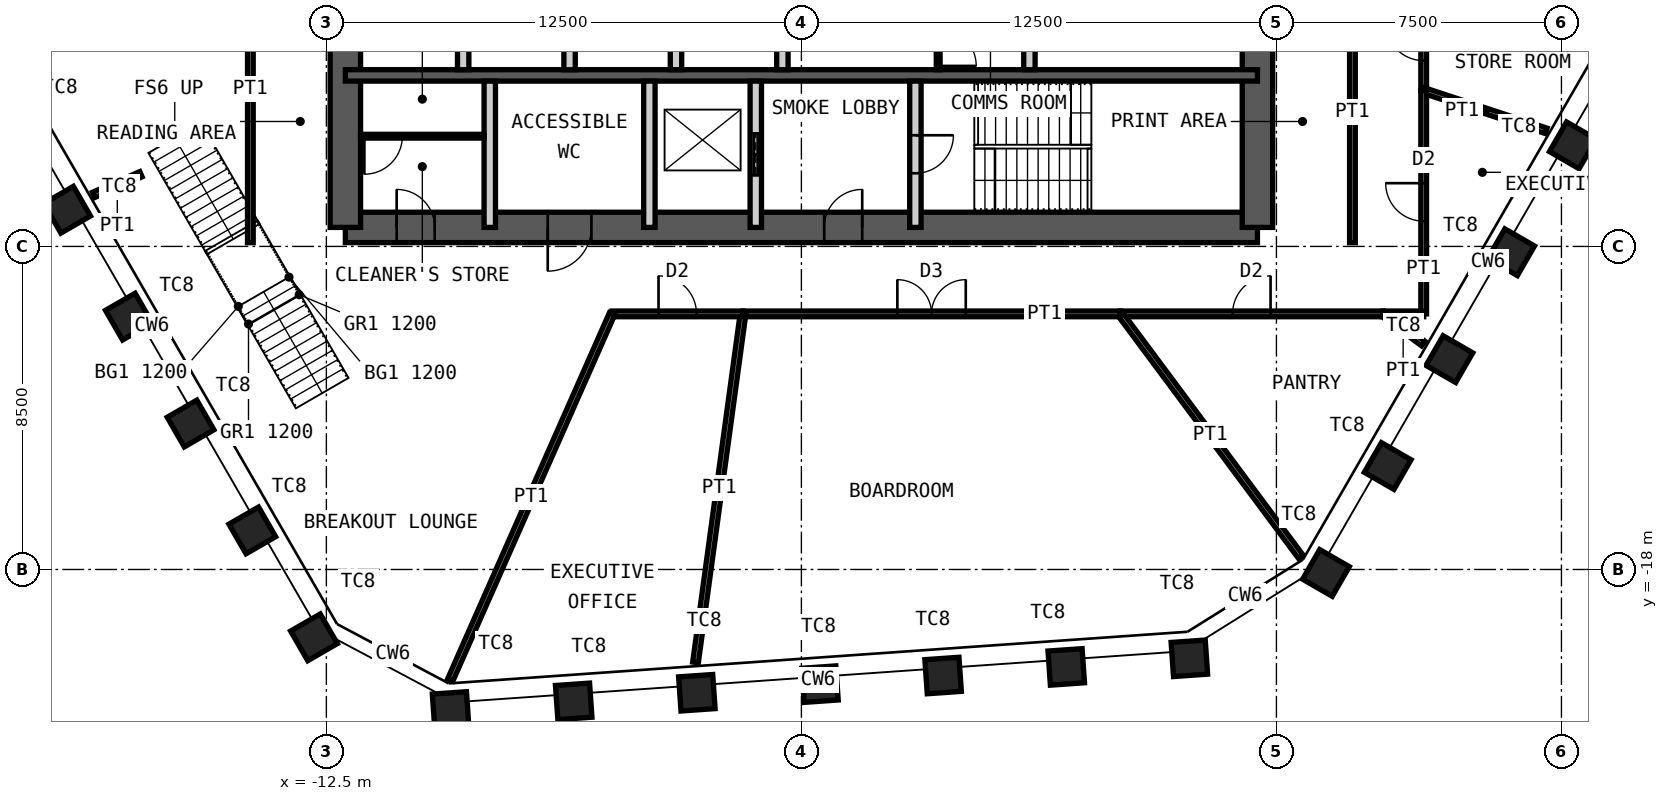
"""IFC4 building model, lengths in metres.
Left out: names, types, materials, properties, quantities, classifications, styles, units other than length and angle.
Written with IfcOpenShell. Run it as: python <this file> out.ifc"""

import sys

from ifc_helpers import new_model, si_unit, direction, frame, frame_2d, origin, origin_2d, place, context, subcontext, project, spatial, rectangle, hollow_rectangle, extrude, element, fill, save


model = new_model("IFC4")
c1 = context("Model", 3, precision=1e-05, world=origin(), true_north=direction((0.0, 1.0)))
c2 = subcontext(c1, "Body", "Model", "MODEL_VIEW")
j1 = project(units=[si_unit("LENGTHUNIT", "METRE"), si_unit("PLANEANGLEUNIT", "RADIAN")], contexts=[c1])
p1 = place(None, origin())
s1 = spatial("IfcSite", under=j1, at=p1, CompositionType="ELEMENT")
p2 = place(p1, origin())
s2 = spatial("IfcBuilding", under=s1, at=p2, CompositionType="ELEMENT")
p3 = place(p2, frame((0.0, 0.0, 329.2)))
s3 = spatial("IfcBuildingStorey", under=s2, at=p3, CompositionType="ELEMENT", Elevation=329.2)
for number, where, z_axis, x_axis in (
    (1, (20.3, -6.84, 0.0), (0.0, 0.0, 1.0), (0.5, 0.866, 0.0)),
    (2, (18.676, -9.653, 0.0), (0.0, 0.0, 1.0), (0.5, 0.866, 0.0)),
    (3, (17.052, -12.466, 0.0), (0.0, 0.0, 1.0), (0.5, 0.866, 0.0)),
    (4, (15.427, -15.279, 0.0), (0.0, 0.0, 1.0), (0.5, 0.866, 0.0)),
    (5, (13.803, -18.092, 0.0), (0.0, 0.0, 1.0), (0.5, 0.866, 0.0)),
    (6, (10.209, -20.337, 0.0), (0.0, 0.0, 1.0), (0.998, 0.07, 0.0)),
    (7, (6.969, -20.564, 0.0), (0.0, 0.0, 1.0), (0.998, 0.07, 0.0)),
    (8, (3.729, -20.791, 0.0), (0.0, 0.0, 1.0), (0.998, 0.07, 0.0)),
    (9, (0.489, -21.017, 0.0), (0.0, 0.0, 1.0), (0.998, 0.07, 0.0)),
    (10, (-2.751, -21.244, 0.0), (0.0, 0.0, 1.0), (0.998, 0.07, 0.0)),
    (11, (-5.991, -21.47, 0.0), (0.0, 0.0, 1.0), (0.998, 0.07, 0.0)),
    (12, (-9.231, -21.697, 0.0), (0.0, 0.0, 1.0), (0.998, 0.07, 0.0)),
    (13, (-12.825, -19.786, 0.0), (0.0, 0.0, 1.0), (0.5, -0.866, 0.0)),
    (14, (-14.449, -16.973, 0.0), (0.0, 0.0, 1.0), (0.5, -0.866, 0.0)),
    (15, (-16.073, -14.16, 0.0), (0.0, 0.0, 1.0), (0.5, -0.866, 0.0)),
    (16, (-17.698, -11.347, 0.0), (0.0, 0.0, 1.0), (0.5, -0.866, 0.0)),
    (17, (-19.322, -8.534, 0.0), (0.0, 0.0, 1.0), (0.5, -0.866, 0.0)),
):
    element("IfcColumn", number, at=place(p3, frame(where, z_axis=z_axis, x_axis=x_axis)), inside=s3, PredefinedType="COLUMN", context=c2, shape_type="SweptSolid", body=[
        extrude(hollow_rectangle(XDim=0.9, YDim=0.9, WallThickness=0.05, at=origin_2d()), origin(), (0.0, 0.0, 1.0), 4.2),
    ])
p4 = place(p3, frame((-12.0, -9.0, 0.0), z_axis=(0.0, 0.0, 1.0), x_axis=(1.0, 0.0, 0.0)))
e18 = element("IfcWall", 18, at=p4, inside=s3, PredefinedType="SHEAR", context=c2, shape_type="SweptSolid", body=[
    extrude(rectangle(XDim=24.0, YDim=0.8, at=frame_2d((12.0, 0.0))), origin(), (0.0, 0.0, 1.0), 4.2),
])
p5 = place(p4, frame((1.35, 0.0, 0.0)))
e19 = element("IfcOpeningElement", 19, at=p5, cuts=e18, PredefinedType="OPENING", context=c2, shape_type="SweptSolid", body=[
    extrude(rectangle(XDim=1.0, YDim=2.1, at=frame_2d((0.5, 1.05))), frame((0.0, 0.41, 0.0), z_axis=(0.0, -1.0, 0.0), x_axis=(1.0, 0.0, 0.0)), (0.0, 0.0, 1.0), 0.82),
])
p6 = place(p4, frame((5.325, 0.0, 0.0)))
e20 = element("IfcOpeningElement", 20, at=p6, cuts=e18, PredefinedType="OPENING", context=c2, shape_type="SweptSolid", body=[
    extrude(rectangle(XDim=1.15, YDim=2.1, at=frame_2d((0.575, 1.05))), frame((0.0, 0.41, 0.0), z_axis=(0.0, -1.0, 0.0), x_axis=(1.0, 0.0, 0.0)), (0.0, 0.0, 1.0), 0.82),
])
p7 = place(p4, frame((12.6, 0.0, 0.0)))
e21 = element("IfcOpeningElement", 21, at=p7, cuts=e18, PredefinedType="OPENING", context=c2, shape_type="SweptSolid", body=[
    extrude(rectangle(XDim=1.0, YDim=2.1, at=frame_2d((0.5, 1.05))), frame((0.0, 0.41, 0.0), z_axis=(0.0, -1.0, 0.0), x_axis=(1.0, 0.0, 0.0)), (0.0, 0.0, 1.0), 0.82),
])
p8 = place(p3, frame((12.0, -9.0, 0.0), z_axis=(0.0, 0.0, 1.0), x_axis=(0.0, 1.0, 0.0)))
e22 = element("IfcWall", 22, at=p8, inside=s3, PredefinedType="SHEAR", context=c2, shape_type="SweptSolid", body=[
    extrude(rectangle(XDim=18.0, YDim=0.8, at=frame_2d((9.0, 0.0))), origin(), (0.0, 0.0, 1.0), 4.2),
])
p9 = place(p8, frame((8.1, 0.0, 0.0)))
e23 = element("IfcOpeningElement", 23, at=p9, cuts=e22, PredefinedType="OPENING", context=c2, shape_type="SweptSolid", body=[
    extrude(rectangle(XDim=1.8, YDim=2.1, at=frame_2d((0.9, 1.05))), frame((0.0, 0.41, 0.0), z_axis=(0.0, -1.0, 0.0), x_axis=(1.0, 0.0, 0.0)), (0.0, 0.0, 1.0), 0.82),
])
p10 = place(p3, frame((-12.0, -9.0, 0.0), z_axis=(0.0, 0.0, 1.0), x_axis=(0.0, 1.0, 0.0)))
e24 = element("IfcWall", 24, at=p10, inside=s3, PredefinedType="SHEAR", context=c2, shape_type="SweptSolid", body=[
    extrude(rectangle(XDim=18.0, YDim=0.8, at=frame_2d((9.0, 0.0))), origin(), (0.0, 0.0, 1.0), 4.2),
])
p11 = place(p10, frame((8.1, 0.0, 0.0)))
e25 = element("IfcOpeningElement", 25, at=p11, cuts=e24, PredefinedType="OPENING", context=c2, shape_type="SweptSolid", body=[
    extrude(rectangle(XDim=1.8, YDim=2.1, at=frame_2d((0.9, 1.05))), frame((0.0, 0.41, 0.0), z_axis=(0.0, -1.0, 0.0), x_axis=(1.0, 0.0, 0.0)), (0.0, 0.0, 1.0), 0.82),
])
p12 = place(p3, frame((-12.0, -5.0, 0.0), z_axis=(0.0, 0.0, 1.0), x_axis=(1.0, 0.0, 0.0)))
e26 = element("IfcWall", 26, at=p12, inside=s3, PredefinedType="SHEAR", context=c2, shape_type="SweptSolid", body=[
    extrude(rectangle(XDim=24.0, YDim=0.3, at=frame_2d((12.0, 0.0))), origin(), (0.0, 0.0, 1.0), 4.2),
])
for number, where, z_axis, x_axis in (
    (27, (-8.9, -4.85, 0.0), (0.0, 0.0, 1.0), (0.0, 1.0, 0.0)),
    (28, (-6.1, -4.85, 0.0), (0.0, 0.0, 1.0), (0.0, 1.0, 0.0)),
    (29, (-3.3, -4.85, 0.0), (0.0, 0.0, 1.0), (0.0, 1.0, 0.0)),
    (30, (-0.5, -4.85, 0.0), (0.0, 0.0, 1.0), (0.0, 1.0, 0.0)),
    (31, (6.0, -4.85, 0.0), (0.0, 0.0, 1.0), (0.0, 1.0, 0.0)),
):
    element("IfcWall", number, at=place(p3, frame(where, z_axis=z_axis, x_axis=x_axis)), inside=s3, PredefinedType="PARTITIONING", context=c2, shape_type="SweptSolid", body=[
        extrude(rectangle(XDim=2.65, YDim=0.3, at=frame_2d((1.325, 0.0))), origin(), (0.0, 0.0, 1.0), 3.98),
    ])
for number, where, z_axis, x_axis in (
    (32, (-8.2, -9.0, 0.0), (0.0, 0.0, 1.0), (0.0, 1.0, 0.0)),
    (33, (-4.0, -9.0, 0.0), (0.0, 0.0, 1.0), (0.0, 1.0, 0.0)),
):
    element("IfcWall", number, at=place(p3, frame(where, z_axis=z_axis, x_axis=x_axis)), inside=s3, PredefinedType="PARTITIONING", context=c2, shape_type="SweptSolid", body=[
        extrude(rectangle(XDim=3.85, YDim=0.3, at=frame_2d((1.925, 0.0))), origin(), (0.0, 0.0, 1.0), 3.98),
    ])
p13 = place(p3, frame((-1.2, -9.0, 0.0), z_axis=(0.0, 0.0, 1.0), x_axis=(0.0, 1.0, 0.0)))
e34 = element("IfcWall", 34, at=p13, inside=s3, PredefinedType="PARTITIONING", context=c2, shape_type="SweptSolid", body=[
    extrude(rectangle(XDim=3.85, YDim=0.3, at=frame_2d((1.925, 0.0))), origin(), (0.0, 0.0, 1.0), 3.98),
])
p14 = place(p13, frame((1.375, 0.0, 0.0)))
e35 = element("IfcOpeningElement", 35, at=p14, cuts=e34, PredefinedType="OPENING", context=c2, shape_type="SweptSolid", body=[
    extrude(rectangle(XDim=1.1, YDim=2.4, at=frame_2d((0.55, 1.2))), frame((0.0, 0.16, 0.0), z_axis=(0.0, -1.0, 0.0), x_axis=(1.0, 0.0, 0.0)), (0.0, 0.0, 1.0), 0.32),
])
p15 = place(p3, frame((3.0, -9.0, 0.0), z_axis=(0.0, 0.0, 1.0), x_axis=(0.0, 1.0, 0.0)))
e36 = element("IfcWall", 36, at=p15, inside=s3, PredefinedType="PARTITIONING", context=c2, shape_type="SweptSolid", body=[
    extrude(rectangle(XDim=3.85, YDim=0.3, at=frame_2d((1.925, 0.0))), origin(), (0.0, 0.0, 1.0), 3.98),
])
p16 = place(p15, frame((1.425, 0.0, 0.0)))
e37 = element("IfcOpeningElement", 37, at=p16, cuts=e36, PredefinedType="OPENING", context=c2, shape_type="SweptSolid", body=[
    extrude(rectangle(XDim=1.0, YDim=2.1, at=frame_2d((0.5, 1.05))), frame((0.0, 0.16, 0.0), z_axis=(0.0, -1.0, 0.0), x_axis=(1.0, 0.0, 0.0)), (0.0, 0.0, 1.0), 0.32),
])
p17 = place(p3, frame((3.6, -4.85, 0.0), z_axis=(0.0, 0.0, 1.0), x_axis=(0.0, 1.0, 0.0)))
e38 = element("IfcWall", 38, at=p17, inside=s3, PredefinedType="PARTITIONING", context=c2, shape_type="SweptSolid", body=[
    extrude(rectangle(XDim=2.65, YDim=0.1, at=frame_2d((1.325, 0.0))), origin(), (0.0, 0.0, 1.0), 3.98),
])
p18 = place(p17, frame((0.1, 0.0, 0.0)))
e39 = element("IfcOpeningElement", 39, at=p18, cuts=e38, PredefinedType="OPENING", context=c2, shape_type="SweptSolid", body=[
    extrude(rectangle(XDim=1.0, YDim=2.4, at=frame_2d((0.5, 1.2))), frame((0.0, 0.06, 0.0), z_axis=(0.0, -1.0, 0.0), x_axis=(1.0, 0.0, 0.0)), (0.0, 0.0, 1.0), 0.12),
])
p19 = place(p3, frame((-11.6, -6.6, 0.0), z_axis=(0.0, 0.0, 1.0), x_axis=(1.0, 0.0, 0.0)))
e40 = element("IfcWall", 40, at=p19, inside=s3, PredefinedType="PARTITIONING", context=c2, shape_type="SweptSolid", body=[
    extrude(rectangle(XDim=3.25, YDim=0.1, at=frame_2d((1.625, 0.0))), origin(), (0.0, 0.0, 1.0), 3.98),
])
p20 = place(p19, frame((0.1, 0.0, 0.0)))
e41 = element("IfcOpeningElement", 41, at=p20, cuts=e40, PredefinedType="OPENING", context=c2, shape_type="SweptSolid", body=[
    extrude(rectangle(XDim=1.0, YDim=2.4, at=frame_2d((0.5, 1.2))), frame((0.0, 0.06, 0.0), z_axis=(0.0, -1.0, 0.0), x_axis=(1.0, 0.0, 0.0)), (0.0, 0.0, 1.0), 0.12),
])
p21 = place(p3, frame((16.375, -2.825, 0.0), z_axis=(0.0, 0.0, 1.0), x_axis=(0.0, -1.0, 0.0)))
e42 = element("IfcWall", 42, at=p21, inside=s3, PredefinedType="PARTITIONING", context=c2, shape_type="SweptSolid", body=[
    extrude(rectangle(XDim=2.572, YDim=0.15, at=frame_2d((1.286, 0.0))), origin(), (0.0, 0.0, 1.0), 4.03),
])
p22 = place(p21, frame((0.786, 0.0, 0.0)))
e43 = element("IfcOpeningElement", 43, at=p22, cuts=e42, PredefinedType="OPENING", context=c2, shape_type="SweptSolid", body=[
    extrude(rectangle(XDim=1.0, YDim=2.4, at=frame_2d((0.5, 1.2))), frame((0.0, 0.085, 0.0), z_axis=(0.0, -1.0, 0.0), x_axis=(1.0, 0.0, 0.0)), (0.0, 0.0, 1.0), 0.17),
])
p23 = place(p3, frame((19.598, -6.459, 0.0), z_axis=(0.0, 0.0, 1.0), x_axis=(-0.949756799168, 0.312988853532, 0.0)))
e44 = element("IfcWall", 44, at=p23, inside=s3, PredefinedType="PARTITIONING", context=c2, shape_type="SweptSolid", body=[
    extrude(rectangle(XDim=3.394, YDim=0.15, at=frame_2d((1.697, 0.0))), origin(), (0.0, 0.0, 1.0), 3.33),
])
p24 = place(p3, frame((16.375, -5.396, 0.0), z_axis=(0.0, 0.0, 1.0), x_axis=(0.0, -1.0, 0.0)))
e45 = element("IfcWall", 45, at=p24, inside=s3, PredefinedType="PARTITIONING", context=c2, shape_type="SweptSolid", body=[
    extrude(rectangle(XDim=5.878, YDim=0.15, at=frame_2d((2.939, 0.0))), origin(), (0.0, 0.0, 1.0), 4.03),
])
p25 = place(p24, frame((2.439, 0.0, 0.0)))
e46 = element("IfcOpeningElement", 46, at=p25, cuts=e45, PredefinedType="OPENING", context=c2, shape_type="SweptSolid", body=[
    extrude(rectangle(XDim=1.0, YDim=2.4, at=frame_2d((0.5, 1.2))), frame((0.0, 0.085, 0.0), z_axis=(0.0, -1.0, 0.0), x_axis=(1.0, 0.0, 0.0)), (0.0, 0.0, 1.0), 0.17),
])
p26 = place(p3, frame((16.375, -11.275, 0.0), z_axis=(0.0, 0.0, 1.0), x_axis=(-1.0, 0.0, 0.0)))
e47 = element("IfcWall", 47, at=p26, inside=s3, PredefinedType="PARTITIONING", context=c2, shape_type="SweptSolid", body=[
    extrude(rectangle(XDim=1.071, YDim=0.15, at=frame_2d((0.535, 0.0))), origin(), (0.0, 0.0, 1.0), 4.03),
])
p27 = place(p3, frame((16.365, -12.056, 0.0), z_axis=(0.0, 0.0, 1.0), x_axis=(-0.805107064944, 0.593129508604, 0.0)))
e48 = element("IfcWall", 48, at=p27, inside=s3, PredefinedType="PARTITIONING", context=c2, shape_type="SweptSolid", body=[
    extrude(rectangle(XDim=1.318, YDim=0.15, at=frame_2d((0.659, 0.0))), origin(), (0.0, 0.0, 1.0), 3.33),
])
p28 = place(p3, frame((15.304, -11.275, 0.0), z_axis=(0.0, 0.0, 1.0), x_axis=(-1.0, 0.0, 0.0)))
e49 = element("IfcWall", 49, at=p28, inside=s3, PredefinedType="PARTITIONING", context=c2, shape_type="SweptSolid", body=[
    extrude(rectangle(XDim=6.917, YDim=0.15, at=frame_2d((3.458, 0.0))), origin(), (0.0, 0.0, 1.0), 4.03),
])
p29 = place(p28, frame((2.958, 0.0, 0.0)))
e50 = element("IfcOpeningElement", 50, at=p29, cuts=e49, PredefinedType="OPENING", context=c2, shape_type="SweptSolid", body=[
    extrude(rectangle(XDim=1.0, YDim=2.4, at=frame_2d((0.5, 1.2))), frame((0.0, 0.085, 0.0), z_axis=(0.0, -1.0, 0.0), x_axis=(1.0, 0.0, 0.0)), (0.0, 0.0, 1.0), 0.17),
])
p30 = place(p3, frame((13.138, -17.661, 0.0), z_axis=(0.0, 0.0, 1.0), x_axis=(-0.596829877953, 0.802367806422, 0.0)))
e51 = element("IfcWall", 51, at=p30, inside=s3, PredefinedType="PARTITIONING", context=c2, shape_type="SweptSolid", body=[
    extrude(rectangle(XDim=7.959, YDim=0.15, at=frame_2d((3.98, 0.0))), origin(), (0.0, 0.0, 1.0), 2.93),
])
p31 = place(p3, frame((8.387, -11.275, 0.0), z_axis=(0.0, 0.0, 1.0), x_axis=(-1.0, 0.0, 0.0)))
e52 = element("IfcWall", 52, at=p31, inside=s3, PredefinedType="PARTITIONING", context=c2, shape_type="SweptSolid", body=[
    extrude(rectangle(XDim=9.924, YDim=0.15, at=frame_2d((4.962, 0.0))), origin(), (0.0, 0.0, 1.0), 4.03),
])
p32 = place(p31, frame((4.062, 0.0, 0.0)))
e53 = element("IfcOpeningElement", 53, at=p32, cuts=e52, PredefinedType="OPENING", context=c2, shape_type="SweptSolid", body=[
    extrude(rectangle(XDim=1.8, YDim=2.4, at=frame_2d((0.9, 1.2))), frame((0.0, 0.085, 0.0), z_axis=(0.0, -1.0, 0.0), x_axis=(1.0, 0.0, 0.0)), (0.0, 0.0, 1.0), 0.17),
])
p33 = place(p3, frame((-2.786, -20.446, 0.0), z_axis=(0.0, 0.0, 1.0), x_axis=(0.13501904213, 0.990843003842, 0.0)))
e54 = element("IfcWall", 54, at=p33, inside=s3, PredefinedType="PARTITIONING", context=c2, shape_type="SweptSolid", body=[
    extrude(rectangle(XDim=9.256, YDim=0.15, at=frame_2d((4.628, 0.0))), origin(), (0.0, 0.0, 1.0), 3.33),
])
p34 = place(p3, frame((-1.537, -11.275, 0.0), z_axis=(0.0, 0.0, 1.0), x_axis=(-1.0, 0.0, 0.0)))
e55 = element("IfcWall", 55, at=p34, inside=s3, PredefinedType="PARTITIONING", context=c2, shape_type="SweptSolid", body=[
    extrude(rectangle(XDim=3.446, YDim=0.15, at=frame_2d((1.723, 0.0))), origin(), (0.0, 0.0, 1.0), 4.03),
])
p35 = place(p34, frame((1.223, 0.0, 0.0)))
e56 = element("IfcOpeningElement", 56, at=p35, cuts=e55, PredefinedType="OPENING", context=c2, shape_type="SweptSolid", body=[
    extrude(rectangle(XDim=1.0, YDim=2.4, at=frame_2d((0.5, 1.2))), frame((0.0, 0.085, 0.0), z_axis=(0.0, -1.0, 0.0), x_axis=(1.0, 0.0, 0.0)), (0.0, 0.0, 1.0), 0.17),
])
p36 = place(p3, frame((-9.24, -20.907, 0.0), z_axis=(0.0, 0.0, 1.0), x_axis=(0.404227449851, 0.91465849845, 0.0)))
e57 = element("IfcWall", 57, at=p36, inside=s3, PredefinedType="PARTITIONING", context=c2, shape_type="SweptSolid", body=[
    extrude(rectangle(XDim=10.531, YDim=0.15, at=frame_2d((5.265, 0.0))), origin(), (0.0, 0.0, 1.0), 2.93),
])
p37 = place(p3, frame((-18.624, -8.144, 0.0), z_axis=(0.0, 0.0, 1.0), x_axis=(0.91615320959, 0.400828263172, 0.0)))
e58 = element("IfcWall", 58, at=p37, inside=s3, PredefinedType="PARTITIONING", context=c2, shape_type="SweptSolid", body=[
    extrude(rectangle(XDim=1.358, YDim=0.15, at=frame_2d((0.679, 0.0))), origin(), (0.0, 0.0, 1.0), 3.33),
])
for number, where, z_axis, x_axis in (
    (59, (14.5, -9.4, 0.0), (0.0, 0.0, 1.0), (0.0, 1.0, 0.0)),
    (60, (-14.5, -9.4, 0.0), (0.0, 0.0, 1.0), (0.0, 1.0, 0.0)),
):
    element("IfcWall", number, at=place(p3, frame(where, z_axis=z_axis, x_axis=x_axis)), inside=s3, PredefinedType="PARTITIONING", context=c2, shape_type="SweptSolid", body=[
        extrude(rectangle(XDim=6.9, YDim=0.15, at=frame_2d((3.45, 0.0))), origin(), (0.0, 0.0, 1.0), 4.03),
    ])
p38 = place(p5, origin())
e61 = element("IfcDoor", 61, at=p38, inside=s3, OperationType="SINGLE_SWING_RIGHT", PredefinedType="DOOR", context=c2, shape_type="SweptSolid", body=[
    extrude(rectangle(XDim=1.0, YDim=2.1, at=frame_2d((0.5, 1.05))), frame((0.0, 0.025, 0.0), z_axis=(0.0, -1.0, 0.0), x_axis=(1.0, 0.0, 0.0)), (0.0, 0.0, 1.0), 0.05),
])
fill(e19, e61)
p39 = place(p6, origin())
e62 = element("IfcDoor", 62, at=p39, inside=s3, OperationType="SINGLE_SWING_LEFT", PredefinedType="DOOR", context=c2, shape_type="SweptSolid", body=[
    extrude(rectangle(XDim=1.15, YDim=2.1, at=frame_2d((0.575, 1.05))), frame((0.0, 0.025, 0.0), z_axis=(0.0, -1.0, 0.0), x_axis=(1.0, 0.0, 0.0)), (0.0, 0.0, 1.0), 0.05),
])
fill(e20, e62)
p40 = place(p7, origin())
e63 = element("IfcDoor", 63, at=p40, inside=s3, OperationType="SINGLE_SWING_LEFT", PredefinedType="DOOR", context=c2, shape_type="SweptSolid", body=[
    extrude(rectangle(XDim=1.0, YDim=2.1, at=frame_2d((0.5, 1.05))), frame((0.0, 0.025, 0.0), z_axis=(0.0, -1.0, 0.0), x_axis=(1.0, 0.0, 0.0)), (0.0, 0.0, 1.0), 0.05),
])
fill(e21, e63)
p41 = place(p16, origin())
e64 = element("IfcDoor", 64, at=p41, inside=s3, OperationType="SINGLE_SWING_RIGHT", PredefinedType="DOOR", context=c2, shape_type="SweptSolid", body=[
    extrude(rectangle(XDim=1.0, YDim=2.1, at=frame_2d((0.5, 1.05))), frame((0.0, 0.025, 0.0), z_axis=(0.0, -1.0, 0.0), x_axis=(1.0, 0.0, 0.0)), (0.0, 0.0, 1.0), 0.05),
])
fill(e37, e64)
p42 = place(p14, origin())
e65 = element("IfcDoor", 65, at=p42, inside=s3, OperationType="DOUBLE_DOOR_SLIDING", PredefinedType="DOOR", context=c2, shape_type="SweptSolid", body=[
    extrude(rectangle(XDim=1.1, YDim=2.4, at=frame_2d((0.55, 1.2))), frame((0.0, 0.025, 0.0), z_axis=(0.0, -1.0, 0.0), x_axis=(1.0, 0.0, 0.0)), (0.0, 0.0, 1.0), 0.05),
])
fill(e35, e65)
p43 = place(p18, origin())
e66 = element("IfcDoor", 66, at=p43, inside=s3, OperationType="SINGLE_SWING_LEFT", PredefinedType="DOOR", context=c2, shape_type="SweptSolid", body=[
    extrude(rectangle(XDim=1.0, YDim=2.4, at=frame_2d((0.5, 1.2))), frame((0.0, 0.025, 0.0), z_axis=(0.0, -1.0, 0.0), x_axis=(1.0, 0.0, 0.0)), (0.0, 0.0, 1.0), 0.05),
])
fill(e39, e66)
p44 = place(p20, origin())
e67 = element("IfcDoor", 67, at=p44, inside=s3, OperationType="SINGLE_SWING_LEFT", PredefinedType="DOOR", context=c2, shape_type="SweptSolid", body=[
    extrude(rectangle(XDim=1.0, YDim=2.4, at=frame_2d((0.5, 1.2))), frame((0.0, 0.025, 0.0), z_axis=(0.0, -1.0, 0.0), x_axis=(1.0, 0.0, 0.0)), (0.0, 0.0, 1.0), 0.05),
])
fill(e41, e67)
p45 = place(p22, origin())
e68 = element("IfcDoor", 68, at=p45, inside=s3, OperationType="SINGLE_SWING_LEFT", PredefinedType="DOOR", context=c2, shape_type="SweptSolid", body=[
    extrude(rectangle(XDim=1.0, YDim=2.4, at=frame_2d((0.5, 1.2))), frame((0.0, 0.025, 0.0), z_axis=(0.0, -1.0, 0.0), x_axis=(1.0, 0.0, 0.0)), (0.0, 0.0, 1.0), 0.05),
])
fill(e43, e68)
p46 = place(p25, origin())
e69 = element("IfcDoor", 69, at=p46, inside=s3, OperationType="SINGLE_SWING_LEFT", PredefinedType="DOOR", context=c2, shape_type="SweptSolid", body=[
    extrude(rectangle(XDim=1.0, YDim=2.4, at=frame_2d((0.5, 1.2))), frame((0.0, 0.025, 0.0), z_axis=(0.0, -1.0, 0.0), x_axis=(1.0, 0.0, 0.0)), (0.0, 0.0, 1.0), 0.05),
])
fill(e46, e69)
p47 = place(p29, origin())
e70 = element("IfcDoor", 70, at=p47, inside=s3, OperationType="SINGLE_SWING_LEFT", PredefinedType="DOOR", context=c2, shape_type="SweptSolid", body=[
    extrude(rectangle(XDim=1.0, YDim=2.4, at=frame_2d((0.5, 1.2))), frame((0.0, 0.025, 0.0), z_axis=(0.0, -1.0, 0.0), x_axis=(1.0, 0.0, 0.0)), (0.0, 0.0, 1.0), 0.05),
])
fill(e50, e70)
p48 = place(p32, origin())
e71 = element("IfcDoor", 71, at=p48, inside=s3, OperationType="DOUBLE_DOOR_DOUBLE_SWING", PredefinedType="DOOR", context=c2, shape_type="SweptSolid", body=[
    extrude(rectangle(XDim=1.8, YDim=2.4, at=frame_2d((0.9, 1.2))), frame((0.0, 0.025, 0.0), z_axis=(0.0, -1.0, 0.0), x_axis=(1.0, 0.0, 0.0)), (0.0, 0.0, 1.0), 0.05),
])
fill(e53, e71)
p49 = place(p35, origin())
e72 = element("IfcDoor", 72, at=p49, inside=s3, OperationType="SINGLE_SWING_RIGHT", PredefinedType="DOOR", context=c2, shape_type="SweptSolid", body=[
    extrude(rectangle(XDim=1.0, YDim=2.4, at=frame_2d((0.5, 1.2))), frame((0.0, 0.025, 0.0), z_axis=(0.0, -1.0, 0.0), x_axis=(1.0, 0.0, 0.0)), (0.0, 0.0, 1.0), 0.05),
])
fill(e56, e72)
save(model, sys.argv[1])
